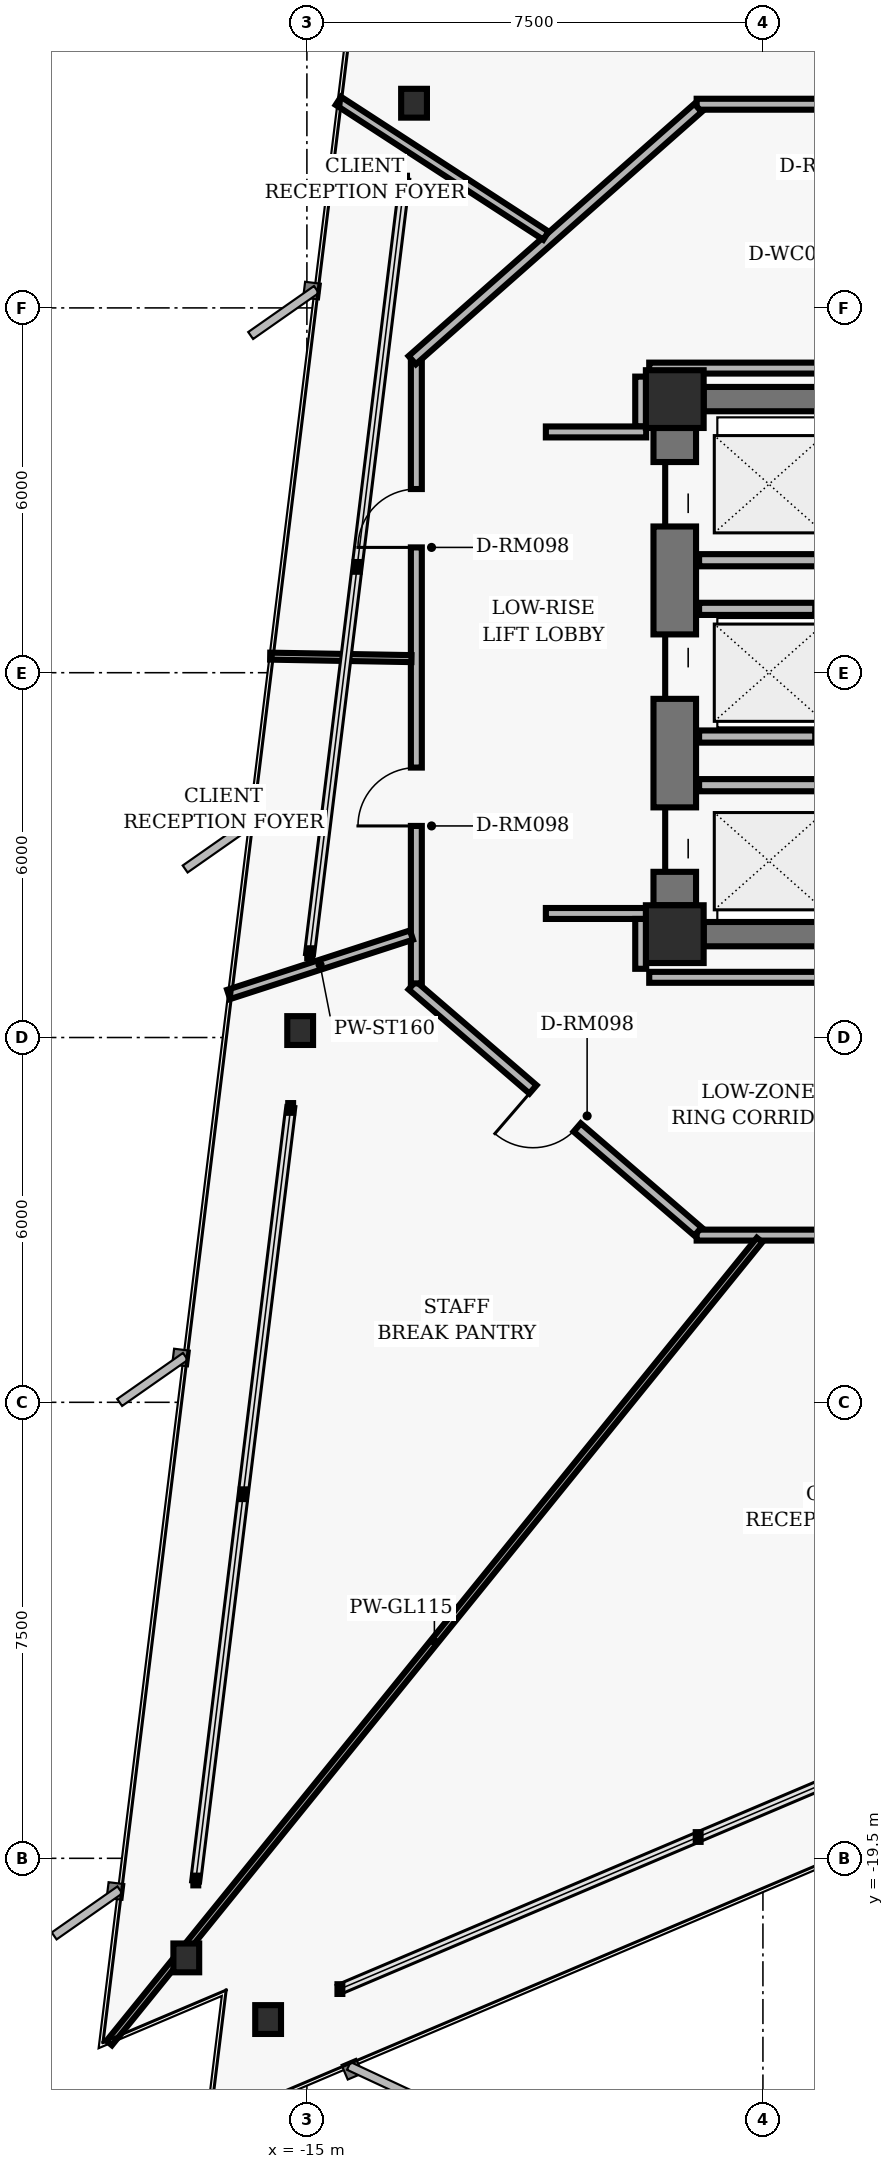
"""IFC4 building model, lengths in metres.
Left out: names, types, materials, properties, quantities, classifications, styles, units other than length and angle.
Written with IfcOpenShell. Run it as: python <this file> out.ifc"""

import sys

from ifc_helpers import new_model, si_unit, direction, frame, frame_2d, origin, origin_2d, place, context, subcontext, project, spatial, rectangle, hollow_rectangle, i_section, extrude, element, fill, save


model = new_model("IFC4")
c1 = context("Model", 3, precision=1e-05, world=origin(), true_north=direction((0.0, 1.0)))
c2 = subcontext(c1, "Body", "Model", "MODEL_VIEW")
j1 = project(units=[si_unit("LENGTHUNIT", "METRE"), si_unit("PLANEANGLEUNIT", "RADIAN")], contexts=[c1])
p1 = place(None, origin())
s1 = spatial("IfcSite", under=j1, at=p1, CompositionType="ELEMENT")
p2 = place(p1, origin())
s2 = spatial("IfcBuilding", under=s1, at=p2, CompositionType="ELEMENT")
p3 = place(p2, frame((0.0, 0.0, 59.68)))
s3 = spatial("IfcBuildingStorey", under=s2, at=p3, CompositionType="ELEMENT", Elevation=59.68)
for number, where, z_axis, x_axis in (
    (1, (-8.95, 4.5, 0.0), (0.0, 0.0, 1.0), (1.0, 0.0, 0.0)),
    (2, (-8.95, -4.3, 0.0), (0.0, 0.0, 1.0), (1.0, 0.0, 0.0)),
):
    element("IfcColumn", number, at=place(p3, frame(where, z_axis=z_axis, x_axis=x_axis)), inside=s3, PredefinedType="COLUMN", context=c2, shape_type="SweptSolid", body=[
        extrude(hollow_rectangle(XDim=0.95, YDim=0.95, WallThickness=0.06, InnerFilletRadius=0.02, OuterFilletRadius=0.04, at=origin_2d()), origin(), (0.0, 0.0, 1.0), 3.36),
    ])
p4 = place(p3, frame((-8.95, -3.825, 0.0), z_axis=(0.0, 0.0, 1.0), x_axis=(0.0, 1.0, 0.0)))
e3 = element("IfcWall", 3, at=p4, inside=s3, PredefinedType="SHEAR", context=c2, shape_type="SweptSolid", body=[
    extrude(rectangle(XDim=7.85, YDim=0.7, at=frame_2d((3.925, 0.0))), origin(), (0.0, 0.0, 1.0), 3.098),
])
p5 = place(p4, frame((0.55, 0.0, 0.0)))
e4 = element("IfcOpeningElement", 4, at=p5, cuts=e3, PredefinedType="OPENING", context=c2, shape_type="SweptSolid", body=[
    extrude(rectangle(XDim=1.06, YDim=2.04, at=frame_2d((0.53, 1.02))), frame((0.0, 0.36, 0.0), z_axis=(0.0, -1.0, 0.0), x_axis=(1.0, 0.0, 0.0)), (0.0, 0.0, 1.0), 0.72),
])
p6 = place(p4, frame((3.395, 0.0, 0.0)))
e5 = element("IfcOpeningElement", 5, at=p6, cuts=e3, PredefinedType="OPENING", context=c2, shape_type="SweptSolid", body=[
    extrude(rectangle(XDim=1.06, YDim=2.04, at=frame_2d((0.53, 1.02))), frame((0.0, 0.36, 0.0), z_axis=(0.0, -1.0, 0.0), x_axis=(1.0, 0.0, 0.0)), (0.0, 0.0, 1.0), 0.72),
])
p7 = place(p4, frame((6.23, 0.0, 0.0)))
e6 = element("IfcOpeningElement", 6, at=p7, cuts=e3, PredefinedType="OPENING", context=c2, shape_type="SweptSolid", body=[
    extrude(rectangle(XDim=1.06, YDim=2.04, at=frame_2d((0.53, 1.02))), frame((0.0, 0.36, 0.0), z_axis=(0.0, -1.0, 0.0), x_axis=(1.0, 0.0, 0.0)), (0.0, 0.0, 1.0), 0.72),
])
for number, where, z_axis, x_axis in (
    (7, (-8.475, 4.5, 0.0), (0.0, 0.0, 1.0), (1.0, 0.0, 0.0)),
    (8, (-8.475, -4.3, 0.0), (0.0, 0.0, 1.0), (1.0, 0.0, 0.0)),
):
    element("IfcWall", number, at=place(p3, frame(where, z_axis=z_axis, x_axis=x_axis)), inside=s3, PredefinedType="SHEAR", context=c2, shape_type="SweptSolid", body=[
        extrude(rectangle(XDim=1.95, YDim=0.4, at=frame_2d((0.975, 0.0))), origin(), (0.0, 0.0, 1.0), 3.098),
    ])
for number, where, z_axis, x_axis in (
    (9, (-13.238, 9.366, 0.0), (0.0, 0.0, 1.0), (1.0, 0.0, 0.0)),
    (10, (-15.111, -5.886, 0.0), (0.0, 0.0, 1.0), (1.0, 0.0, 0.0)),
    (11, (-16.983, -21.138, 0.0), (0.0, 0.0, 1.0), (1.0, 0.0, 0.0)),
    (12, (-15.638, -22.152, 0.0), (0.0, 0.0, 1.0), (1.0, 0.0, 0.0)),
):
    element("IfcColumn", number, at=place(p3, frame(where, z_axis=z_axis, x_axis=x_axis)), inside=s3, PredefinedType="COLUMN", context=c2, shape_type="SweptSolid", body=[
        extrude(i_section(OverallWidth=0.424, OverallDepth=0.474, WebThickness=0.048, FlangeThickness=0.077, FilletRadius=0.025, at=origin_2d()), origin(), (0.0, 0.0, 1.0), 3.36),
    ])
for number, where, z_axis, x_axis in (
    (13, (-8.55, -1.85, 0.0), (0.0, 0.0, 1.0), (1.0, 0.0, 0.0)),
    (14, (-8.55, 1.85, 0.0), (0.0, 0.0, 1.0), (1.0, 0.0, 0.0)),
):
    element("IfcWall", number, at=place(p3, frame(where, z_axis=z_axis, x_axis=x_axis)), inside=s3, PredefinedType="PARTITIONING", context=c2, shape_type="SweptSolid", body=[
        extrude(rectangle(XDim=2.1, YDim=0.2, at=frame_2d((1.05, 0.0))), origin(), (0.0, 0.0, 1.0), 3.073),
    ])
for number, where, z_axis, x_axis in (
    (15, (-8.55, -1.05, 0.0), (0.0, 0.0, 1.0), (1.0, 0.0, 0.0)),
    (16, (-8.55, 1.05, 0.0), (0.0, 0.0, 1.0), (1.0, 0.0, 0.0)),
):
    element("IfcWall", number, at=place(p3, frame(where, z_axis=z_axis, x_axis=x_axis)), inside=s3, PredefinedType="PARTITIONING", context=c2, shape_type="SweptSolid", body=[
        extrude(rectangle(XDim=1.91, YDim=0.2, at=frame_2d((0.955, 0.0))), origin(), (0.0, 0.0, 1.0), 3.073),
    ])
p8 = place(p3, frame((-8.59, 9.35, 0.0), z_axis=(0.0, 0.0, 1.0), x_axis=(1.0, 0.0, 0.0)))
e17 = element("IfcWall", 17, at=p8, inside=s3, PredefinedType="PARTITIONING", context=c2, shape_type="SweptSolid", body=[
    extrude(rectangle(XDim=17.18, YDim=0.18, at=frame_2d((8.59, 0.0))), origin(), (0.0, 0.0, 1.0), 3.073),
])
p9 = place(p8, frame((13.54, 0.0, 0.0)))
e18 = element("IfcOpeningElement", 18, at=p9, cuts=e17, PredefinedType="OPENING", context=c2, shape_type="SweptSolid", body=[
    extrude(rectangle(XDim=0.96, YDim=2.02, at=frame_2d((0.48, 1.01))), frame((0.0, 0.1, 0.0), z_axis=(0.0, -1.0, 0.0), x_axis=(1.0, 0.0, 0.0)), (0.0, 0.0, 1.0), 0.2),
])
p10 = place(p8, frame((7.453, 0.0, 0.0)))
e19 = element("IfcOpeningElement", 19, at=p10, cuts=e17, PredefinedType="OPENING", context=c2, shape_type="SweptSolid", body=[
    extrude(rectangle(XDim=1.18, YDim=2.02, at=frame_2d((0.59, 1.01))), frame((0.0, 0.1, 0.0), z_axis=(0.0, -1.0, 0.0), x_axis=(1.0, 0.0, 0.0)), (0.0, 0.0, 1.0), 0.2),
])
p11 = place(p8, frame((2.133, 0.0, 0.0)))
e20 = element("IfcOpeningElement", 20, at=p11, cuts=e17, PredefinedType="OPENING", context=c2, shape_type="SweptSolid", body=[
    extrude(rectangle(XDim=0.96, YDim=2.02, at=frame_2d((0.48, 1.01))), frame((0.0, 0.1, 0.0), z_axis=(0.0, -1.0, 0.0), x_axis=(1.0, 0.0, 0.0)), (0.0, 0.0, 1.0), 0.2),
])
p12 = place(p3, frame((8.41, -9.25, 0.0), z_axis=(0.0, 0.0, 1.0), x_axis=(-1.0, 0.0, 0.0)))
e21 = element("IfcWall", 21, at=p12, inside=s3, PredefinedType="PARTITIONING", context=c2, shape_type="SweptSolid", body=[
    extrude(rectangle(XDim=17.0, YDim=0.18, at=frame_2d((8.5, 0.0))), origin(), (0.0, 0.0, 1.0), 2.587),
])
p13 = place(p12, frame((12.127, 0.0, 0.0)))
e22 = element("IfcOpeningElement", 22, at=p13, cuts=e21, PredefinedType="OPENING", context=c2, shape_type="SweptSolid", body=[
    extrude(rectangle(XDim=0.96, YDim=2.02, at=frame_2d((0.48, 1.01))), frame((0.0, 0.1, 0.0), z_axis=(0.0, -1.0, 0.0), x_axis=(1.0, 0.0, 0.0)), (0.0, 0.0, 1.0), 0.2),
])
p14 = place(p12, frame((5.75, 0.0, 0.0)))
e23 = element("IfcOpeningElement", 23, at=p14, cuts=e21, PredefinedType="OPENING", context=c2, shape_type="SweptSolid", body=[
    extrude(rectangle(XDim=0.96, YDim=2.02, at=frame_2d((0.48, 1.01))), frame((0.0, 0.1, 0.0), z_axis=(0.0, -1.0, 0.0), x_axis=(1.0, 0.0, 0.0)), (0.0, 0.0, 1.0), 0.2),
])
p15 = place(p3, frame((-8.568, -9.191, 0.0), z_axis=(0.0, 0.0, 1.0), x_axis=(-0.757556899173, 0.652769135694, 0.0)))
e24 = element("IfcWall", 24, at=p15, inside=s3, PredefinedType="PARTITIONING", context=c2, shape_type="SweptSolid", body=[
    extrude(rectangle(XDim=6.204, YDim=0.18, at=frame_2d((3.102, 0.0))), origin(), (0.0, 0.0, 1.0), 3.073),
])
p16 = place(p15, frame((2.622, 0.0, 0.0)))
e25 = element("IfcOpeningElement", 25, at=p16, cuts=e24, PredefinedType="OPENING", context=c2, shape_type="SweptSolid", body=[
    extrude(rectangle(XDim=0.96, YDim=2.02, at=frame_2d((0.48, 1.01))), frame((0.0, 0.1, 0.0), z_axis=(0.0, -1.0, 0.0), x_axis=(1.0, 0.0, 0.0)), (0.0, 0.0, 1.0), 0.2),
])
p17 = place(p3, frame((-13.2, -5.11, 0.0), z_axis=(0.0, 0.0, 1.0), x_axis=(0.0, 1.0, 0.0)))
e26 = element("IfcWall", 26, at=p17, inside=s3, PredefinedType="PARTITIONING", context=c2, shape_type="SweptSolid", body=[
    extrude(rectangle(XDim=10.22, YDim=0.18, at=frame_2d((5.11, 0.0))), origin(), (0.0, 0.0, 1.0), 2.587),
])
p18 = place(p17, frame((2.59, 0.0, 0.0)))
e27 = element("IfcOpeningElement", 27, at=p18, cuts=e26, PredefinedType="OPENING", context=c2, shape_type="SweptSolid", body=[
    extrude(rectangle(XDim=0.96, YDim=2.02, at=frame_2d((0.48, 1.01))), frame((0.0, 0.1, 0.0), z_axis=(0.0, -1.0, 0.0), x_axis=(1.0, 0.0, 0.0)), (0.0, 0.0, 1.0), 0.2),
])
p19 = place(p17, frame((7.171, 0.0, 0.0)))
e28 = element("IfcOpeningElement", 28, at=p19, cuts=e26, PredefinedType="OPENING", context=c2, shape_type="SweptSolid", body=[
    extrude(rectangle(XDim=0.96, YDim=2.02, at=frame_2d((0.48, 1.01))), frame((0.0, 0.1, 0.0), z_axis=(0.0, -1.0, 0.0), x_axis=(1.0, 0.0, 0.0)), (0.0, 0.0, 1.0), 0.2),
])
p20 = place(p3, frame((-13.268, 5.14, 0.0), z_axis=(0.0, 0.0, 1.0), x_axis=(0.749626463267, 0.66186113768, 0.0)))
e29 = element("IfcWall", 29, at=p20, inside=s3, PredefinedType="PARTITIONING", context=c2, shape_type="SweptSolid", body=[
    extrude(rectangle(XDim=6.27, YDim=0.18, at=frame_2d((3.135, 0.0))), origin(), (0.0, 0.0, 1.0), 3.073),
])
p21 = place(p3, frame((-9.51, 4.87, 0.0), z_axis=(0.0, 0.0, 1.0), x_axis=(0.0, -1.0, 0.0)))
e30 = element("IfcWall", 30, at=p21, inside=s3, PredefinedType="PARTITIONING", context=c2, shape_type="SweptSolid", body=[
    extrude(rectangle(XDim=0.82, YDim=0.18, at=frame_2d((0.41, 0.0))), origin(), (0.0, 0.0, 1.0), 3.073),
])
for number, where, z_axis, x_axis in (
    (31, (-9.42, 3.96, 0.0), (0.0, 0.0, 1.0), (-1.0, 0.0, 0.0)),
    (32, (-11.07, -3.96, 0.0), (0.0, 0.0, 1.0), (1.0, 0.0, 0.0)),
):
    element("IfcWall", number, at=place(p3, frame(where, z_axis=z_axis, x_axis=x_axis)), inside=s3, PredefinedType="PARTITIONING", context=c2, shape_type="SweptSolid", body=[
        extrude(rectangle(XDim=1.65, YDim=0.18, at=frame_2d((0.825, 0.0))), origin(), (0.0, 0.0, 1.0), 3.073),
    ])
p22 = place(p3, frame((-9.51, -4.05, 0.0), z_axis=(0.0, 0.0, 1.0), x_axis=(0.0, -1.0, 0.0)))
e33 = element("IfcWall", 33, at=p22, inside=s3, PredefinedType="PARTITIONING", context=c2, shape_type="SweptSolid", body=[
    extrude(rectangle(XDim=0.82, YDim=0.18, at=frame_2d((0.41, 0.0))), origin(), (0.0, 0.0, 1.0), 3.073),
])
p23 = place(p3, frame((-9.37, -5.01, 0.0), z_axis=(0.0, 0.0, 1.0), x_axis=(1.0, 0.0, 0.0)))
e34 = element("IfcWall", 34, at=p23, inside=s3, PredefinedType="PARTITIONING", context=c2, shape_type="SweptSolid", body=[
    extrude(rectangle(XDim=3.34, YDim=0.18, at=frame_2d((1.67, 0.0))), origin(), (0.0, 0.0, 1.0), 3.073),
])
p24 = place(p3, frame((-6.562, 5.01, 0.0), z_axis=(0.0, 0.0, 1.0), x_axis=(-1.0, 0.0, 0.0)))
e35 = element("IfcWall", 35, at=p24, inside=s3, PredefinedType="PARTITIONING", context=c2, shape_type="SweptSolid", body=[
    extrude(rectangle(XDim=2.808, YDim=0.18, at=frame_2d((1.404, 0.0))), origin(), (0.0, 0.0, 1.0), 3.073),
])
p25 = place(p3, frame((-13.28, -4.315, 0.0), z_axis=(0.0, 0.0, 1.0), x_axis=(-0.951057330934, -0.309014487164, 0.0)))
e36 = element("IfcWall", 36, at=p25, inside=s3, PredefinedType="PARTITIONING", context=c2, shape_type="SweptSolid", body=[
    extrude(rectangle(XDim=3.162, YDim=0.16, at=frame_2d((1.581, 0.0))), origin(), (0.0, 0.0, 1.0), 3.073),
])
p26 = place(p3, frame((-7.555, -9.33, 0.0), z_axis=(0.0, 0.0, 1.0), x_axis=(-0.629320948329, -0.777145510181, 0.0)))
e37 = element("IfcWall", 37, at=p26, inside=s3, PredefinedType="MOVABLE", context=c2, shape_type="SweptSolid", body=[
    extrude(rectangle(XDim=16.996, YDim=0.115, at=frame_2d((8.498, 0.0))), origin(), (0.0, 0.0, 1.0), 2.358),
])
p27 = place(p3, frame((-3.62, 9.43, 0.0), z_axis=(0.0, 0.0, 1.0), x_axis=(-0.358366182081, 0.933581104961, 0.0)))
e38 = element("IfcWall", 38, at=p27, inside=s3, PredefinedType="PARTITIONING", context=c2, shape_type="SweptSolid", body=[
    extrude(rectangle(XDim=18.901, YDim=0.24, at=frame_2d((9.45, 0.0))), origin(), (0.0, 0.0, 1.0), 3.073),
])
p28 = place(p3, frame((-11.069, 7.188, 0.0), z_axis=(0.0, 0.0, 1.0), x_axis=(-0.838653238926, 0.544665718436, 0.0)))
e39 = element("IfcWall", 39, at=p28, inside=s3, PredefinedType="PARTITIONING", context=c2, shape_type="SweptSolid", body=[
    extrude(rectangle(XDim=4.07, YDim=0.16, at=frame_2d((2.035, 0.0))), origin(), (0.0, 0.0, 1.0), 2.358),
])
p29 = place(p3, frame((-13.28, 0.232, 0.0), z_axis=(0.0, 0.0, 1.0), x_axis=(-0.999846109686, 0.017543002765, 0.0)))
e40 = element("IfcWall", 40, at=p29, inside=s3, PredefinedType="MOVABLE", context=c2, shape_type="SweptSolid", body=[
    extrude(rectangle(XDim=2.324, YDim=0.115, at=frame_2d((1.162, 0.0))), origin(), (0.0, 0.0, 1.0), 3.073),
])
p30 = place(p5, origin())
e41 = element("IfcDoor", 41, at=p30, inside=s3, OperationType="SLIDING_TO_LEFT", PredefinedType="DOOR", context=c2, shape_type="SweptSolid", body=[
    extrude(rectangle(XDim=1.06, YDim=2.04, at=frame_2d((0.53, 1.02))), frame((0.0, 0.025, 0.0), z_axis=(0.0, -1.0, 0.0), x_axis=(1.0, 0.0, 0.0)), (0.0, 0.0, 1.0), 0.05),
])
fill(e4, e41)
p31 = place(p6, origin())
e42 = element("IfcDoor", 42, at=p31, inside=s3, OperationType="SLIDING_TO_RIGHT", PredefinedType="DOOR", context=c2, shape_type="SweptSolid", body=[
    extrude(rectangle(XDim=1.06, YDim=2.04, at=frame_2d((0.53, 1.02))), frame((0.0, 0.025, 0.0), z_axis=(0.0, -1.0, 0.0), x_axis=(1.0, 0.0, 0.0)), (0.0, 0.0, 1.0), 0.05),
])
fill(e5, e42)
p32 = place(p7, origin())
e43 = element("IfcDoor", 43, at=p32, inside=s3, OperationType="SLIDING_TO_LEFT", PredefinedType="DOOR", context=c2, shape_type="SweptSolid", body=[
    extrude(rectangle(XDim=1.06, YDim=2.04, at=frame_2d((0.53, 1.02))), frame((0.0, 0.025, 0.0), z_axis=(0.0, -1.0, 0.0), x_axis=(1.0, 0.0, 0.0)), (0.0, 0.0, 1.0), 0.05),
])
fill(e6, e43)
p33 = place(p18, origin())
e44 = element("IfcDoor", 44, at=p33, inside=s3, OperationType="SINGLE_SWING_LEFT", PredefinedType="DOOR", context=c2, shape_type="SweptSolid", body=[
    extrude(rectangle(XDim=0.96, YDim=2.02, at=frame_2d((0.48, 1.01))), frame((0.0, 0.025, 0.0), z_axis=(0.0, -1.0, 0.0), x_axis=(1.0, 0.0, 0.0)), (0.0, 0.0, 1.0), 0.05),
])
fill(e27, e44)
p34 = place(p16, origin())
e45 = element("IfcDoor", 45, at=p34, inside=s3, OperationType="SINGLE_SWING_RIGHT", PredefinedType="DOOR", context=c2, shape_type="SweptSolid", body=[
    extrude(rectangle(XDim=0.96, YDim=2.02, at=frame_2d((0.48, 1.01))), frame((0.0, 0.025, 0.0), z_axis=(0.0, -1.0, 0.0), x_axis=(1.0, 0.0, 0.0)), (0.0, 0.0, 1.0), 0.05),
])
fill(e25, e45)
p35 = place(p19, origin())
e46 = element("IfcDoor", 46, at=p35, inside=s3, OperationType="SINGLE_SWING_LEFT", PredefinedType="DOOR", context=c2, shape_type="SweptSolid", body=[
    extrude(rectangle(XDim=0.96, YDim=2.02, at=frame_2d((0.48, 1.01))), frame((0.0, 0.025, 0.0), z_axis=(0.0, -1.0, 0.0), x_axis=(1.0, 0.0, 0.0)), (0.0, 0.0, 1.0), 0.05),
])
fill(e28, e46)
save(model, sys.argv[1])
